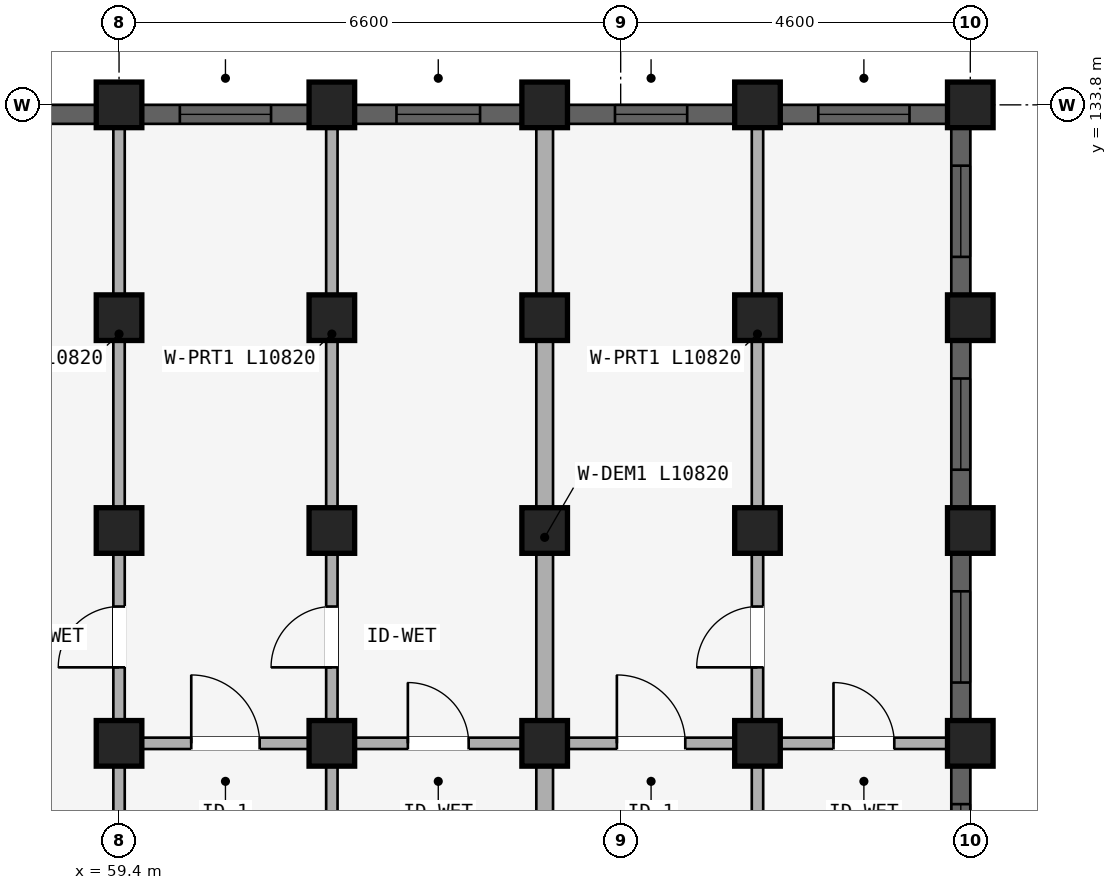
"""IFC4 building model, lengths in metres.
Left out: names, types, materials, properties, quantities, classifications, styles, units other than length and angle.
Written with IfcOpenShell. Run it as: python <this file> out.ifc"""

import sys

from ifc_helpers import new_model, si_unit, direction, frame, frame_2d, origin, origin_2d, place, context, subcontext, project, spatial, rectangle, extrude, element, fill, save


model = new_model("IFC4")
c1 = context("Model", 3, precision=1e-05, world=origin(), true_north=direction((0.0, 1.0)))
c2 = subcontext(c1, "Body", "Model", "MODEL_VIEW")
j1 = project(units=[si_unit("LENGTHUNIT", "METRE"), si_unit("PLANEANGLEUNIT", "RADIAN")], contexts=[c1])
p1 = place(None, origin())
s1 = spatial("IfcSite", under=j1, at=p1, CompositionType="ELEMENT")
p2 = place(p1, origin())
s2 = spatial("IfcBuilding", under=s1, at=p2, CompositionType="ELEMENT")
p3 = place(p2, frame((0.0, 0.0, 33.9)))
s3 = spatial("IfcBuildingStorey", under=s2, at=p3, CompositionType="ELEMENT", Elevation=33.9)
for number, where, z_axis, x_axis in (
    (1, (59.4, 125.4, 0.0), (0.0, 0.0, 1.0), (1.0, 0.0, 0.0)),
    (2, (59.4, 128.2, 0.0), (0.0, 0.0, 1.0), (1.0, 0.0, 0.0)),
    (3, (59.4, 131.0, 0.0), (0.0, 0.0, 1.0), (1.0, 0.0, 0.0)),
    (4, (59.4, 133.8, 0.0), (0.0, 0.0, 1.0), (1.0, 0.0, 0.0)),
    (5, (62.2, 125.4, 0.0), (0.0, 0.0, 1.0), (1.0, 0.0, 0.0)),
    (6, (62.2, 128.2, 0.0), (0.0, 0.0, 1.0), (1.0, 0.0, 0.0)),
    (7, (62.2, 131.0, 0.0), (0.0, 0.0, 1.0), (1.0, 0.0, 0.0)),
    (8, (62.2, 133.8, 0.0), (0.0, 0.0, 1.0), (1.0, 0.0, 0.0)),
    (9, (65.0, 125.4, 0.0), (0.0, 0.0, 1.0), (1.0, 0.0, 0.0)),
    (10, (65.0, 128.2, 0.0), (0.0, 0.0, 1.0), (1.0, 0.0, 0.0)),
    (11, (65.0, 131.0, 0.0), (0.0, 0.0, 1.0), (1.0, 0.0, 0.0)),
    (12, (65.0, 133.8, 0.0), (0.0, 0.0, 1.0), (1.0, 0.0, 0.0)),
    (13, (67.8, 125.4, 0.0), (0.0, 0.0, 1.0), (1.0, 0.0, 0.0)),
    (14, (67.8, 128.2, 0.0), (0.0, 0.0, 1.0), (1.0, 0.0, 0.0)),
    (15, (67.8, 131.0, 0.0), (0.0, 0.0, 1.0), (1.0, 0.0, 0.0)),
    (16, (67.8, 133.8, 0.0), (0.0, 0.0, 1.0), (1.0, 0.0, 0.0)),
    (17, (70.6, 125.4, 0.0), (0.0, 0.0, 1.0), (1.0, 0.0, 0.0)),
    (18, (70.6, 128.2, 0.0), (0.0, 0.0, 1.0), (1.0, 0.0, 0.0)),
    (19, (70.6, 131.0, 0.0), (0.0, 0.0, 1.0), (1.0, 0.0, 0.0)),
    (20, (70.6, 133.8, 0.0), (0.0, 0.0, 1.0), (1.0, 0.0, 0.0)),
):
    element("IfcColumn", number, at=place(p3, frame(where, z_axis=z_axis, x_axis=x_axis)), inside=s3, PredefinedType="COLUMN", context=c2, shape_type="SweptSolid", body=[
        extrude(rectangle(XDim=0.6, YDim=0.6, at=origin_2d()), origin(), (0.0, 0.0, 1.0), 2.93),
    ])
p4 = place(p3, frame((59.48, 125.4, 0.0), z_axis=(0.0, 0.0, 1.0), x_axis=(1.0, 0.0, 0.0)))
e21 = element("IfcWall", 21, at=p4, inside=s3, PredefinedType="PLUMBINGWALL", context=c2, shape_type="SweptSolid", body=[
    extrude(rectangle(XDim=2.64, YDim=0.15, at=frame_2d((1.32, 0.0))), origin(), (0.0, 0.0, 1.0), 2.372),
])
p5 = place(p4, frame((0.87, 0.0, 0.0)))
e22 = element("IfcOpeningElement", 22, at=p5, cuts=e21, PredefinedType="OPENING", context=c2, shape_type="SweptSolid", body=[
    extrude(rectangle(XDim=0.9, YDim=2.1, at=frame_2d((0.45, 1.05))), frame((0.0, 0.085, 0.0), z_axis=(0.0, -1.0, 0.0), x_axis=(1.0, 0.0, 0.0)), (0.0, 0.0, 1.0), 0.17),
])
p6 = place(p3, frame((62.28, 125.4, 0.0), z_axis=(0.0, 0.0, 1.0), x_axis=(1.0, 0.0, 0.0)))
e23 = element("IfcWall", 23, at=p6, inside=s3, PredefinedType="PLUMBINGWALL", context=c2, shape_type="SweptSolid", body=[
    extrude(rectangle(XDim=2.64, YDim=0.15, at=frame_2d((1.32, 0.0))), origin(), (0.0, 0.0, 1.0), 2.372),
])
p7 = place(p6, frame((0.92, 0.0, 0.0)))
e24 = element("IfcOpeningElement", 24, at=p7, cuts=e23, PredefinedType="OPENING", context=c2, shape_type="SweptSolid", body=[
    extrude(rectangle(XDim=0.8, YDim=2.1, at=frame_2d((0.4, 1.05))), frame((0.0, 0.085, 0.0), z_axis=(0.0, -1.0, 0.0), x_axis=(1.0, 0.0, 0.0)), (0.0, 0.0, 1.0), 0.17),
])
p8 = place(p3, frame((65.08, 125.4, 0.0), z_axis=(0.0, 0.0, 1.0), x_axis=(1.0, 0.0, 0.0)))
e25 = element("IfcWall", 25, at=p8, inside=s3, PredefinedType="PLUMBINGWALL", context=c2, shape_type="SweptSolid", body=[
    extrude(rectangle(XDim=2.64, YDim=0.15, at=frame_2d((1.32, 0.0))), origin(), (0.0, 0.0, 1.0), 2.372),
])
p9 = place(p8, frame((0.87, 0.0, 0.0)))
e26 = element("IfcOpeningElement", 26, at=p9, cuts=e25, PredefinedType="OPENING", context=c2, shape_type="SweptSolid", body=[
    extrude(rectangle(XDim=0.9, YDim=2.1, at=frame_2d((0.45, 1.05))), frame((0.0, 0.085, 0.0), z_axis=(0.0, -1.0, 0.0), x_axis=(1.0, 0.0, 0.0)), (0.0, 0.0, 1.0), 0.17),
])
p10 = place(p3, frame((67.88, 125.4, 0.0), z_axis=(0.0, 0.0, 1.0), x_axis=(1.0, 0.0, 0.0)))
e27 = element("IfcWall", 27, at=p10, inside=s3, PredefinedType="PLUMBINGWALL", context=c2, shape_type="SweptSolid", body=[
    extrude(rectangle(XDim=2.64, YDim=0.15, at=frame_2d((1.32, 0.0))), origin(), (0.0, 0.0, 1.0), 2.372),
])
p11 = place(p10, frame((0.92, 0.0, 0.0)))
e28 = element("IfcOpeningElement", 28, at=p11, cuts=e27, PredefinedType="OPENING", context=c2, shape_type="SweptSolid", body=[
    extrude(rectangle(XDim=0.8, YDim=2.1, at=frame_2d((0.4, 1.05))), frame((0.0, 0.085, 0.0), z_axis=(0.0, -1.0, 0.0), x_axis=(1.0, 0.0, 0.0)), (0.0, 0.0, 1.0), 0.17),
])
p12 = place(p3, frame((59.4, 122.7, 0.0), z_axis=(0.0, 0.0, 1.0), x_axis=(0.0, 1.0, 0.0)))
e29 = element("IfcWall", 29, at=p12, inside=s3, PredefinedType="PARTITIONING", context=c2, shape_type="SweptSolid", body=[
    extrude(rectangle(XDim=10.82, YDim=0.15, at=frame_2d((5.41, 0.0))), origin(), (0.0, 0.0, 1.0), 2.372),
])
p13 = place(p12, frame((3.7, 0.0, 0.0)))
e30 = element("IfcOpeningElement", 30, at=p13, cuts=e29, PredefinedType="OPENING", context=c2, shape_type="SweptSolid", body=[
    extrude(rectangle(XDim=0.8, YDim=2.1, at=frame_2d((0.4, 1.05))), frame((0.0, 0.085, 0.0), z_axis=(0.0, -1.0, 0.0), x_axis=(1.0, 0.0, 0.0)), (0.0, 0.0, 1.0), 0.17),
])
p14 = place(p3, frame((62.2, 122.7, 0.0), z_axis=(0.0, 0.0, 1.0), x_axis=(0.0, 1.0, 0.0)))
e31 = element("IfcWall", 31, at=p14, inside=s3, PredefinedType="PARTITIONING", context=c2, shape_type="SweptSolid", body=[
    extrude(rectangle(XDim=10.82, YDim=0.15, at=frame_2d((5.41, 0.0))), origin(), (0.0, 0.0, 1.0), 2.372),
])
p15 = place(p14, frame((3.7, 0.0, 0.0)))
e32 = element("IfcOpeningElement", 32, at=p15, cuts=e31, PredefinedType="OPENING", context=c2, shape_type="SweptSolid", body=[
    extrude(rectangle(XDim=0.8, YDim=2.1, at=frame_2d((0.4, 1.05))), frame((0.0, 0.085, 0.0), z_axis=(0.0, -1.0, 0.0), x_axis=(1.0, 0.0, 0.0)), (0.0, 0.0, 1.0), 0.17),
])
p16 = place(p3, frame((65.0, 122.7, 0.0), z_axis=(0.0, 0.0, 1.0), x_axis=(0.0, 1.0, 0.0)))
e33 = element("IfcWall", 33, at=p16, inside=s3, PredefinedType="STANDARD", context=c2, shape_type="SweptSolid", body=[
    extrude(rectangle(XDim=10.82, YDim=0.22, at=frame_2d((5.41, 0.0))), origin(), (0.0, 0.0, 1.0), 2.372),
])
p17 = place(p3, frame((67.8, 122.7, 0.0), z_axis=(0.0, 0.0, 1.0), x_axis=(0.0, 1.0, 0.0)))
e34 = element("IfcWall", 34, at=p17, inside=s3, PredefinedType="PARTITIONING", context=c2, shape_type="SweptSolid", body=[
    extrude(rectangle(XDim=10.82, YDim=0.15, at=frame_2d((5.41, 0.0))), origin(), (0.0, 0.0, 1.0), 2.372),
])
p18 = place(p17, frame((3.7, 0.0, 0.0)))
e35 = element("IfcOpeningElement", 35, at=p18, cuts=e34, PredefinedType="OPENING", context=c2, shape_type="SweptSolid", body=[
    extrude(rectangle(XDim=0.8, YDim=2.1, at=frame_2d((0.4, 1.05))), frame((0.0, 0.085, 0.0), z_axis=(0.0, -1.0, 0.0), x_axis=(1.0, 0.0, 0.0)), (0.0, 0.0, 1.0), 0.17),
])
p19 = place(p3, frame((54.104, 133.675, 0.0), z_axis=(0.0, 0.0, 1.0), x_axis=(1.0, 0.0, 0.0)))
e36 = element("IfcWall", 36, at=p19, inside=s3, PredefinedType="STANDARD", context=c2, shape_type="SweptSolid", body=[
    extrude(rectangle(XDim=4.993, YDim=0.25, at=frame_2d((2.497, 0.0))), origin(), (0.0, 0.0, 1.0), 2.472),
])
p20 = place(p19, frame((1.822, 0.0, 0.672)))
e37 = element("IfcOpeningElement", 37, at=p20, cuts=e36, PredefinedType="OPENING", context=c2, shape_type="SweptSolid", body=[
    extrude(rectangle(XDim=1.35, YDim=1.6, at=frame_2d((0.675, 0.8))), frame((0.0, 0.135, 0.0), z_axis=(0.0, -1.0, 0.0), x_axis=(1.0, 0.0, 0.0)), (0.0, 0.0, 1.0), 0.27),
])
p21 = place(p3, frame((59.704, 133.675, 0.0), z_axis=(0.0, 0.0, 1.0), x_axis=(1.0, 0.0, 0.0)))
e38 = element("IfcWall", 38, at=p21, inside=s3, PredefinedType="STANDARD", context=c2, shape_type="SweptSolid", body=[
    extrude(rectangle(XDim=2.193, YDim=0.25, at=frame_2d((1.096, 0.0))), origin(), (0.0, 0.0, 1.0), 2.472),
])
p22 = place(p21, frame((0.497, 0.0, 0.772)))
e39 = element("IfcOpeningElement", 39, at=p22, cuts=e38, PredefinedType="OPENING", context=c2, shape_type="SweptSolid", body=[
    extrude(rectangle(XDim=1.2, YDim=1.5, at=frame_2d((0.6, 0.75))), frame((0.0, 0.135, 0.0), z_axis=(0.0, -1.0, 0.0), x_axis=(1.0, 0.0, 0.0)), (0.0, 0.0, 1.0), 0.27),
])
p23 = place(p3, frame((62.503, 133.675, 0.0), z_axis=(0.0, 0.0, 1.0), x_axis=(1.0, 0.0, 0.0)))
e40 = element("IfcWall", 40, at=p23, inside=s3, PredefinedType="STANDARD", context=c2, shape_type="SweptSolid", body=[
    extrude(rectangle(XDim=2.193, YDim=0.25, at=frame_2d((1.097, 0.0))), origin(), (0.0, 0.0, 1.0), 2.472),
])
p24 = place(p23, frame((0.546, 0.0, 0.822)))
e41 = element("IfcOpeningElement", 41, at=p24, cuts=e40, PredefinedType="OPENING", context=c2, shape_type="SweptSolid", body=[
    extrude(rectangle(XDim=1.1, YDim=1.45, at=frame_2d((0.55, 0.725))), frame((0.0, 0.135, 0.0), z_axis=(0.0, -1.0, 0.0), x_axis=(1.0, 0.0, 0.0)), (0.0, 0.0, 1.0), 0.27),
])
p25 = place(p3, frame((65.303, 133.675, 0.0), z_axis=(0.0, 0.0, 1.0), x_axis=(1.0, 0.0, 0.0)))
e42 = element("IfcWall", 42, at=p25, inside=s3, PredefinedType="STANDARD", context=c2, shape_type="SweptSolid", body=[
    extrude(rectangle(XDim=2.193, YDim=0.25, at=frame_2d((1.097, 0.0))), origin(), (0.0, 0.0, 1.0), 2.472),
])
p26 = place(p25, frame((0.622, 0.0, 0.88)))
e43 = element("IfcOpeningElement", 43, at=p26, cuts=e42, PredefinedType="OPENING", context=c2, shape_type="SweptSolid", body=[
    extrude(rectangle(XDim=0.95, YDim=1.35, at=frame_2d((0.475, 0.675))), frame((0.0, 0.135, 0.0), z_axis=(0.0, -1.0, 0.0), x_axis=(1.0, 0.0, 0.0)), (0.0, 0.0, 1.0), 0.27),
])
p27 = place(p3, frame((68.104, 133.675, 0.0), z_axis=(0.0, 0.0, 1.0), x_axis=(1.0, 0.0, 0.0)))
e44 = element("IfcWall", 44, at=p27, inside=s3, PredefinedType="STANDARD", context=c2, shape_type="SweptSolid", body=[
    extrude(rectangle(XDim=2.193, YDim=0.25, at=frame_2d((1.096, 0.0))), origin(), (0.0, 0.0, 1.0), 2.472),
])
p28 = place(p27, frame((0.497, 0.0, 0.772)))
e45 = element("IfcOpeningElement", 45, at=p28, cuts=e44, PredefinedType="OPENING", context=c2, shape_type="SweptSolid", body=[
    extrude(rectangle(XDim=1.2, YDim=1.5, at=frame_2d((0.6, 0.75))), frame((0.0, 0.135, 0.0), z_axis=(0.0, -1.0, 0.0), x_axis=(1.0, 0.0, 0.0)), (0.0, 0.0, 1.0), 0.27),
])
p29 = place(p3, frame((70.475, 122.904, 0.0), z_axis=(0.0, 0.0, 1.0), x_axis=(0.0, 1.0, 0.0)))
e46 = element("IfcWall", 46, at=p29, inside=s3, PredefinedType="STANDARD", context=c2, shape_type="SweptSolid", body=[
    extrude(rectangle(XDim=2.193, YDim=0.25, at=frame_2d((1.096, 0.0))), origin(), (0.0, 0.0, 1.0), 2.372),
])
p30 = place(p29, frame((0.497, 0.0, 0.672)))
e47 = element("IfcOpeningElement", 47, at=p30, cuts=e46, PredefinedType="OPENING", context=c2, shape_type="SweptSolid", body=[
    extrude(rectangle(XDim=1.2, YDim=1.5, at=frame_2d((0.6, 0.75))), frame((0.0, 0.135, 0.0), z_axis=(0.0, -1.0, 0.0), x_axis=(1.0, 0.0, 0.0)), (0.0, 0.0, 1.0), 0.27),
])
p31 = place(p3, frame((70.475, 125.704, 0.0), z_axis=(0.0, 0.0, 1.0), x_axis=(0.0, 1.0, 0.0)))
e48 = element("IfcWall", 48, at=p31, inside=s3, PredefinedType="STANDARD", context=c2, shape_type="SweptSolid", body=[
    extrude(rectangle(XDim=2.193, YDim=0.25, at=frame_2d((1.096, 0.0))), origin(), (0.0, 0.0, 1.0), 2.372),
])
p32 = place(p31, frame((0.497, 0.0, 0.672)))
e49 = element("IfcOpeningElement", 49, at=p32, cuts=e48, PredefinedType="OPENING", context=c2, shape_type="SweptSolid", body=[
    extrude(rectangle(XDim=1.2, YDim=1.5, at=frame_2d((0.6, 0.75))), frame((0.0, 0.135, 0.0), z_axis=(0.0, -1.0, 0.0), x_axis=(1.0, 0.0, 0.0)), (0.0, 0.0, 1.0), 0.27),
])
p33 = place(p3, frame((70.475, 128.503, 0.0), z_axis=(0.0, 0.0, 1.0), x_axis=(0.0, 1.0, 0.0)))
e50 = element("IfcWall", 50, at=p33, inside=s3, PredefinedType="STANDARD", context=c2, shape_type="SweptSolid", body=[
    extrude(rectangle(XDim=2.193, YDim=0.25, at=frame_2d((1.097, 0.0))), origin(), (0.0, 0.0, 1.0), 2.372),
])
p34 = place(p33, frame((0.497, 0.0, 0.672)))
e51 = element("IfcOpeningElement", 51, at=p34, cuts=e50, PredefinedType="OPENING", context=c2, shape_type="SweptSolid", body=[
    extrude(rectangle(XDim=1.2, YDim=1.5, at=frame_2d((0.6, 0.75))), frame((0.0, 0.135, 0.0), z_axis=(0.0, -1.0, 0.0), x_axis=(1.0, 0.0, 0.0)), (0.0, 0.0, 1.0), 0.27),
])
p35 = place(p3, frame((70.475, 131.303, 0.0), z_axis=(0.0, 0.0, 1.0), x_axis=(0.0, 1.0, 0.0)))
e52 = element("IfcWall", 52, at=p35, inside=s3, PredefinedType="STANDARD", context=c2, shape_type="SweptSolid", body=[
    extrude(rectangle(XDim=2.193, YDim=0.25, at=frame_2d((1.097, 0.0))), origin(), (0.0, 0.0, 1.0), 2.372),
])
p36 = place(p35, frame((0.497, 0.0, 0.672)))
e53 = element("IfcOpeningElement", 53, at=p36, cuts=e52, PredefinedType="OPENING", context=c2, shape_type="SweptSolid", body=[
    extrude(rectangle(XDim=1.2, YDim=1.5, at=frame_2d((0.6, 0.75))), frame((0.0, 0.135, 0.0), z_axis=(0.0, -1.0, 0.0), x_axis=(1.0, 0.0, 0.0)), (0.0, 0.0, 1.0), 0.27),
])
p37 = place(p22, origin())
e54 = element("IfcWindow", 54, at=p37, inside=s3, PartitioningType="SINGLE_PANEL", PredefinedType="WINDOW", context=c2, shape_type="SweptSolid", body=[
    extrude(rectangle(XDim=1.2, YDim=1.5, at=frame_2d((0.6, 0.75))), frame((0.0, 0.03, 0.0), z_axis=(0.0, -1.0, 0.0), x_axis=(1.0, 0.0, 0.0)), (0.0, 0.0, 1.0), 0.06),
])
fill(e39, e54)
p38 = place(p24, origin())
e55 = element("IfcWindow", 55, at=p38, inside=s3, PartitioningType="SINGLE_PANEL", PredefinedType="WINDOW", context=c2, shape_type="SweptSolid", body=[
    extrude(rectangle(XDim=1.1, YDim=1.45, at=frame_2d((0.55, 0.725))), frame((0.0, 0.03, 0.0), z_axis=(0.0, -1.0, 0.0), x_axis=(1.0, 0.0, 0.0)), (0.0, 0.0, 1.0), 0.06),
])
fill(e41, e55)
p39 = place(p26, origin())
e56 = element("IfcWindow", 56, at=p39, inside=s3, PartitioningType="SINGLE_PANEL", PredefinedType="WINDOW", context=c2, shape_type="SweptSolid", body=[
    extrude(rectangle(XDim=0.95, YDim=1.35, at=frame_2d((0.475, 0.675))), frame((0.0, 0.03, 0.0), z_axis=(0.0, -1.0, 0.0), x_axis=(1.0, 0.0, 0.0)), (0.0, 0.0, 1.0), 0.06),
])
fill(e43, e56)
p40 = place(p28, origin())
e57 = element("IfcWindow", 57, at=p40, inside=s3, PartitioningType="SINGLE_PANEL", PredefinedType="WINDOW", context=c2, shape_type="SweptSolid", body=[
    extrude(rectangle(XDim=1.2, YDim=1.5, at=frame_2d((0.6, 0.75))), frame((0.0, 0.03, 0.0), z_axis=(0.0, -1.0, 0.0), x_axis=(1.0, 0.0, 0.0)), (0.0, 0.0, 1.0), 0.06),
])
fill(e45, e57)
p41 = place(p30, origin())
e58 = element("IfcWindow", 58, at=p41, inside=s3, PartitioningType="SINGLE_PANEL", PredefinedType="WINDOW", context=c2, shape_type="SweptSolid", body=[
    extrude(rectangle(XDim=1.2, YDim=1.5, at=frame_2d((0.6, 0.75))), frame((0.0, 0.03, 0.0), z_axis=(0.0, -1.0, 0.0), x_axis=(1.0, 0.0, 0.0)), (0.0, 0.0, 1.0), 0.06),
])
fill(e47, e58)
p42 = place(p32, origin())
e59 = element("IfcWindow", 59, at=p42, inside=s3, PartitioningType="SINGLE_PANEL", PredefinedType="WINDOW", context=c2, shape_type="SweptSolid", body=[
    extrude(rectangle(XDim=1.2, YDim=1.5, at=frame_2d((0.6, 0.75))), frame((0.0, 0.03, 0.0), z_axis=(0.0, -1.0, 0.0), x_axis=(1.0, 0.0, 0.0)), (0.0, 0.0, 1.0), 0.06),
])
fill(e49, e59)
p43 = place(p34, origin())
e60 = element("IfcWindow", 60, at=p43, inside=s3, PartitioningType="SINGLE_PANEL", PredefinedType="WINDOW", context=c2, shape_type="SweptSolid", body=[
    extrude(rectangle(XDim=1.2, YDim=1.5, at=frame_2d((0.6, 0.75))), frame((0.0, 0.03, 0.0), z_axis=(0.0, -1.0, 0.0), x_axis=(1.0, 0.0, 0.0)), (0.0, 0.0, 1.0), 0.06),
])
fill(e51, e60)
p44 = place(p36, origin())
e61 = element("IfcWindow", 61, at=p44, inside=s3, PartitioningType="SINGLE_PANEL", PredefinedType="WINDOW", context=c2, shape_type="SweptSolid", body=[
    extrude(rectangle(XDim=1.2, YDim=1.5, at=frame_2d((0.6, 0.75))), frame((0.0, 0.03, 0.0), z_axis=(0.0, -1.0, 0.0), x_axis=(1.0, 0.0, 0.0)), (0.0, 0.0, 1.0), 0.06),
])
fill(e53, e61)
p45 = place(p5, origin())
e62 = element("IfcDoor", 62, at=p45, inside=s3, OperationType="SINGLE_SWING_LEFT", PredefinedType="DOOR", context=c2, shape_type="SweptSolid", body=[
    extrude(rectangle(XDim=0.9, YDim=2.1, at=frame_2d((0.45, 1.05))), frame((0.0, 0.025, 0.0), z_axis=(0.0, -1.0, 0.0), x_axis=(1.0, 0.0, 0.0)), (0.0, 0.0, 1.0), 0.05),
])
fill(e22, e62)
p46 = place(p7, origin())
e63 = element("IfcDoor", 63, at=p46, inside=s3, OperationType="SINGLE_SWING_LEFT", PredefinedType="DOOR", context=c2, shape_type="SweptSolid", body=[
    extrude(rectangle(XDim=0.8, YDim=2.1, at=frame_2d((0.4, 1.05))), frame((0.0, 0.025, 0.0), z_axis=(0.0, -1.0, 0.0), x_axis=(1.0, 0.0, 0.0)), (0.0, 0.0, 1.0), 0.05),
])
fill(e24, e63)
p47 = place(p9, origin())
e64 = element("IfcDoor", 64, at=p47, inside=s3, OperationType="SINGLE_SWING_LEFT", PredefinedType="DOOR", context=c2, shape_type="SweptSolid", body=[
    extrude(rectangle(XDim=0.9, YDim=2.1, at=frame_2d((0.45, 1.05))), frame((0.0, 0.025, 0.0), z_axis=(0.0, -1.0, 0.0), x_axis=(1.0, 0.0, 0.0)), (0.0, 0.0, 1.0), 0.05),
])
fill(e26, e64)
p48 = place(p11, origin())
e65 = element("IfcDoor", 65, at=p48, inside=s3, OperationType="SINGLE_SWING_LEFT", PredefinedType="DOOR", context=c2, shape_type="SweptSolid", body=[
    extrude(rectangle(XDim=0.8, YDim=2.1, at=frame_2d((0.4, 1.05))), frame((0.0, 0.025, 0.0), z_axis=(0.0, -1.0, 0.0), x_axis=(1.0, 0.0, 0.0)), (0.0, 0.0, 1.0), 0.05),
])
fill(e28, e65)
p49 = place(p13, frame((0.8, 0.0, 0.0), z_axis=(0.0, 0.0, 1.0), x_axis=(-1.0, 0.0, 0.0)))
e66 = element("IfcDoor", 66, at=p49, inside=s3, OperationType="SINGLE_SWING_RIGHT", PredefinedType="DOOR", context=c2, shape_type="SweptSolid", body=[
    extrude(rectangle(XDim=0.8, YDim=2.1, at=frame_2d((0.4, 1.05))), frame((0.0, 0.025, 0.0), z_axis=(0.0, -1.0, 0.0), x_axis=(1.0, 0.0, 0.0)), (0.0, 0.0, 1.0), 0.05),
])
fill(e30, e66)
p50 = place(p15, origin())
e67 = element("IfcDoor", 67, at=p50, inside=s3, OperationType="SINGLE_SWING_LEFT", PredefinedType="DOOR", context=c2, shape_type="SweptSolid", body=[
    extrude(rectangle(XDim=0.8, YDim=2.1, at=frame_2d((0.4, 1.05))), frame((0.0, 0.025, 0.0), z_axis=(0.0, -1.0, 0.0), x_axis=(1.0, 0.0, 0.0)), (0.0, 0.0, 1.0), 0.05),
])
fill(e32, e67)
p51 = place(p18, frame((0.8, 0.0, 0.0), z_axis=(0.0, 0.0, 1.0), x_axis=(-1.0, 0.0, 0.0)))
e68 = element("IfcDoor", 68, at=p51, inside=s3, OperationType="SINGLE_SWING_RIGHT", PredefinedType="DOOR", context=c2, shape_type="SweptSolid", body=[
    extrude(rectangle(XDim=0.8, YDim=2.1, at=frame_2d((0.4, 1.05))), frame((0.0, 0.025, 0.0), z_axis=(0.0, -1.0, 0.0), x_axis=(1.0, 0.0, 0.0)), (0.0, 0.0, 1.0), 0.05),
])
fill(e35, e68)
save(model, sys.argv[1])
